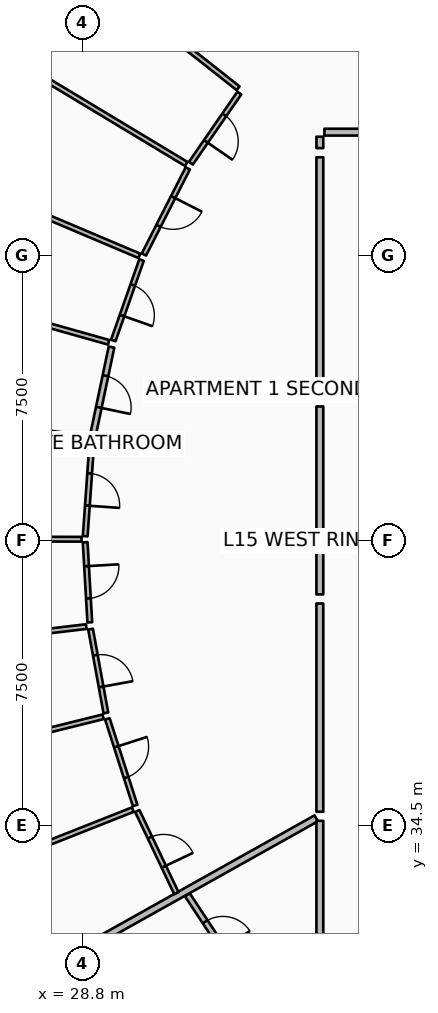
"""IFC4 building model, lengths in metres.
Left out: names, types, materials, properties, quantities, classifications, styles, units other than length and angle.
Written with IfcOpenShell. Run it as: python <this file> out.ifc"""

import sys

from ifc_helpers import new_model, si_unit, direction, frame, frame_2d, origin, place, context, subcontext, project, spatial, rectangle, extrude, element, fill, save


model = new_model("IFC4")
c1 = context("Model", 3, precision=1e-05, world=origin(), true_north=direction((0.0, 1.0)))
c2 = subcontext(c1, "Body", "Model", "MODEL_VIEW")
j1 = project(units=[si_unit("LENGTHUNIT", "METRE"), si_unit("PLANEANGLEUNIT", "RADIAN")], contexts=[c1])
p1 = place(None, origin())
s1 = spatial("IfcSite", under=j1, at=p1, CompositionType="ELEMENT")
p2 = place(p1, origin())
s2 = spatial("IfcBuilding", under=s1, at=p2, CompositionType="ELEMENT")
p3 = place(p2, frame((0.0, 0.0, 63.9)))
s3 = spatial("IfcBuildingStorey", under=s2, at=p3, CompositionType="ELEMENT", Elevation=63.9)
p4 = place(p3, frame((34.954, 34.694, 0.0), z_axis=(0.0, 0.0, 1.0), x_axis=(-0.872493465611, -0.488625779577, 0.0)))
e1 = element("IfcWall", 1, at=p4, inside=s3, PredefinedType="PARTITIONING", context=c2, shape_type="SweptSolid", body=[
    extrude(rectangle(XDim=16.586, YDim=0.18, at=frame_2d((8.293, 0.0))), origin(), (0.0, 0.0, 1.0), 2.867),
])
p5 = place(p3, frame((41.86, 52.75, 0.0), z_axis=(0.0, 0.0, 1.0), x_axis=(-1.0, 0.0, 0.0)))
e2 = element("IfcWall", 2, at=p5, inside=s3, PredefinedType="PARTITIONING", context=c2, shape_type="SweptSolid", body=[
    extrude(rectangle(XDim=6.69, YDim=0.18, at=frame_2d((3.345, 0.0))), origin(), (0.0, 0.0, 1.0), 2.867),
])
p6 = place(p5, frame((2.795, 0.0, 0.0)))
e3 = element("IfcOpeningElement", 3, at=p6, cuts=e2, PredefinedType="OPENING", context=c2, shape_type="SweptSolid", body=[
    extrude(rectangle(XDim=1.1, YDim=2.1, at=frame_2d((0.55, 1.05))), frame((0.0, 0.1, 0.0), z_axis=(0.0, -1.0, 0.0), x_axis=(1.0, 0.0, 0.0)), (0.0, 0.0, 1.0), 0.2),
])
p7 = place(p3, frame((35.05, 52.63, 0.0), z_axis=(0.0, 0.0, 1.0), x_axis=(0.0, -1.0, 0.0)))
e4 = element("IfcWall", 4, at=p7, inside=s3, PredefinedType="PARTITIONING", context=c2, shape_type="SweptSolid", body=[
    extrude(rectangle(XDim=0.301, YDim=0.18, at=frame_2d((0.15, 0.0))), origin(), (0.0, 0.0, 1.0), 2.867),
])
p8 = place(p3, frame((35.05, 52.089, 0.0), z_axis=(0.0, 0.0, 1.0), x_axis=(0.0, -1.0, 0.0)))
e5 = element("IfcWall", 5, at=p8, inside=s3, PredefinedType="PARTITIONING", context=c2, shape_type="SweptSolid", body=[
    extrude(rectangle(XDim=6.317, YDim=0.18, at=frame_2d((3.158, 0.0))), origin(), (0.0, 0.0, 1.0), 2.867),
])
p9 = place(p3, frame((32.898, 53.905, 0.0), z_axis=(0.0, 0.0, 1.0), x_axis=(-0.78532854108, 0.619079221558, 0.0)))
e6 = element("IfcWall", 6, at=p9, inside=s3, PredefinedType="PARTITIONING", context=c2, shape_type="SweptSolid", body=[
    extrude(rectangle(XDim=8.842, YDim=0.125, at=frame_2d((4.421, 0.0))), origin(), (0.0, 0.0, 1.0), 2.867),
])
p10 = place(p3, frame((31.534, 51.913, 0.0), z_axis=(0.0, 0.0, 1.0), x_axis=(-0.856706990958, 0.515803384676, 0.0)))
e7 = element("IfcWall", 7, at=p10, inside=s3, PredefinedType="PARTITIONING", context=c2, shape_type="SweptSolid", body=[
    extrude(rectangle(XDim=9.057, YDim=0.125, at=frame_2d((4.528, 0.0))), origin(), (0.0, 0.0, 1.0), 2.94),
])
p11 = place(p3, frame((30.301, 49.494, 0.0), z_axis=(0.0, 0.0, 1.0), x_axis=(-0.920840746031, 0.389938867579, 0.0)))
e8 = element("IfcWall", 8, at=p11, inside=s3, PredefinedType="PARTITIONING", context=c2, shape_type="SweptSolid", body=[
    extrude(rectangle(XDim=9.966, YDim=0.125, at=frame_2d((4.983, 0.0))), origin(), (0.0, 0.0, 1.0), 2.94),
])
p12 = place(p3, frame((32.931, 53.778, 0.0), z_axis=(0.0, 0.0, 1.0), x_axis=(-0.568541738061, -0.822654418382, 0.0)))
e9 = element("IfcWall", 9, at=p12, inside=s3, PredefinedType="PARTITIONING", context=c2, shape_type="SweptSolid", body=[
    extrude(rectangle(XDim=2.242, YDim=0.125, at=frame_2d((1.121, 0.0))), origin(), (0.0, 0.0, 1.0), 2.867),
])
p13 = place(p12, frame((0.696, 0.0, 0.0)))
e10 = element("IfcOpeningElement", 10, at=p13, cuts=e9, PredefinedType="OPENING", context=c2, shape_type="SweptSolid", body=[
    extrude(rectangle(XDim=0.85, YDim=2.06, at=frame_2d((0.425, 1.03))), frame((0.0, 0.073, 0.0), z_axis=(0.0, -1.0, 0.0), x_axis=(1.0, 0.0, 0.0)), (0.0, 0.0, 1.0), 0.145),
])
p14 = place(p3, frame((31.575, 51.796, 0.0), z_axis=(0.0, 0.0, 1.0), x_axis=(-0.454037986735, -0.890982326762, 0.0)))
e11 = element("IfcWall", 11, at=p14, inside=s3, PredefinedType="PARTITIONING", context=c2, shape_type="SweptSolid", body=[
    extrude(rectangle(XDim=2.542, YDim=0.125, at=frame_2d((1.271, 0.0))), origin(), (0.0, 0.0, 1.0), 2.94),
])
p15 = place(p14, frame((0.846, 0.0, 0.0)))
e12 = element("IfcOpeningElement", 12, at=p15, cuts=e11, PredefinedType="OPENING", context=c2, shape_type="SweptSolid", body=[
    extrude(rectangle(XDim=0.85, YDim=2.06, at=frame_2d((0.425, 1.03))), frame((0.0, 0.073, 0.0), z_axis=(0.0, -1.0, 0.0), x_axis=(1.0, 0.0, 0.0)), (0.0, 0.0, 1.0), 0.145),
])
p16 = place(p3, frame((30.358, 49.384, 0.0), z_axis=(0.0, 0.0, 1.0), x_axis=(-0.331344536708, -0.943509829304, 0.0)))
e13 = element("IfcWall", 13, at=p16, inside=s3, PredefinedType="PARTITIONING", context=c2, shape_type="SweptSolid", body=[
    extrude(rectangle(XDim=2.242, YDim=0.125, at=frame_2d((1.121, 0.0))), origin(), (0.0, 0.0, 1.0), 2.867),
])
p17 = place(p16, frame((0.696, 0.0, 0.0)))
e14 = element("IfcOpeningElement", 14, at=p17, cuts=e13, PredefinedType="OPENING", context=c2, shape_type="SweptSolid", body=[
    extrude(rectangle(XDim=0.85, YDim=2.06, at=frame_2d((0.425, 1.03))), frame((0.0, 0.073, 0.0), z_axis=(0.0, -1.0, 0.0), x_axis=(1.0, 0.0, 0.0)), (0.0, 0.0, 1.0), 0.145),
])
p18 = place(p3, frame((35.05, 45.532, 0.0), z_axis=(0.0, 0.0, 1.0), x_axis=(0.0, -1.0, 0.0)))
e15 = element("IfcWall", 15, at=p18, inside=s3, PredefinedType="PARTITIONING", context=c2, shape_type="SweptSolid", body=[
    extrude(rectangle(XDim=4.945, YDim=0.18, at=frame_2d((2.472, 0.0))), origin(), (0.0, 0.0, 1.0), 2.867),
])
p19 = place(p3, frame((29.492, 47.22, 0.0), z_axis=(0.0, 0.0, 1.0), x_axis=(-0.962454721813, 0.271442274635, 0.0)))
e16 = element("IfcWall", 16, at=p19, inside=s3, PredefinedType="PARTITIONING", context=c2, shape_type="SweptSolid", body=[
    extrude(rectangle(XDim=11.344, YDim=0.125, at=frame_2d((5.672, 0.0))), origin(), (0.0, 0.0, 1.0), 2.867),
])
p20 = place(p3, frame((29.568, 47.095, 0.0), z_axis=(0.0, 0.0, 1.0), x_axis=(-0.205861309483, -0.978581177654, 0.0)))
e17 = element("IfcWall", 17, at=p20, inside=s3, PredefinedType="PARTITIONING", context=c2, shape_type="SweptSolid", body=[
    extrude(rectangle(XDim=2.392, YDim=0.15, at=frame_2d((1.196, 0.0))), origin(), (0.0, 0.0, 1.0), 2.867),
])
p21 = place(p20, frame((0.771, 0.0, 0.0)))
e18 = element("IfcOpeningElement", 18, at=p21, cuts=e17, PredefinedType="OPENING", context=c2, shape_type="SweptSolid", body=[
    extrude(rectangle(XDim=0.85, YDim=2.06, at=frame_2d((0.425, 1.03))), frame((0.0, 0.085, 0.0), z_axis=(0.0, -1.0, 0.0), x_axis=(1.0, 0.0, 0.0)), (0.0, 0.0, 1.0), 0.17),
])
p22 = place(p3, frame((28.968, 44.678, 0.0), z_axis=(0.0, 0.0, 1.0), x_axis=(-0.990240767804, 0.139367219172, 0.0)))
e19 = element("IfcWall", 19, at=p22, inside=s3, PredefinedType="PARTITIONING", context=c2, shape_type="SweptSolid", body=[
    extrude(rectangle(XDim=4.46, YDim=0.15, at=frame_2d((2.23, 0.0))), origin(), (0.0, 0.0, 1.0), 2.94),
])
p23 = place(p3, frame((28.78, 42.038, 0.0), z_axis=(0.0, 0.0, 1.0), x_axis=(-0.999998036955, 0.001981435282, 0.0)))
e20 = element("IfcWall", 20, at=p23, inside=s3, PredefinedType="PARTITIONING", context=c2, shape_type="SweptSolid", body=[
    extrude(rectangle(XDim=12.075, YDim=0.125, at=frame_2d((6.038, 0.0))), origin(), (0.0, 0.0, 1.0), 2.94),
])
p24 = place(p3, frame((29.05, 44.576, 0.0), z_axis=(0.0, 0.0, 1.0), x_axis=(-0.070831673661, -0.997488282641, 0.0)))
e21 = element("IfcWall", 21, at=p24, inside=s3, PredefinedType="PARTITIONING", context=c2, shape_type="SweptSolid", body=[
    extrude(rectangle(XDim=2.464, YDim=0.125, at=frame_2d((1.232, 0.0))), origin(), (0.0, 0.0, 1.0), 2.94),
])
p25 = place(p24, frame((0.807, 0.0, 0.0)))
e22 = element("IfcOpeningElement", 22, at=p25, cuts=e21, PredefinedType="OPENING", context=c2, shape_type="SweptSolid", body=[
    extrude(rectangle(XDim=0.85, YDim=2.06, at=frame_2d((0.425, 1.03))), frame((0.0, 0.073, 0.0), z_axis=(0.0, -1.0, 0.0), x_axis=(1.0, 0.0, 0.0)), (0.0, 0.0, 1.0), 0.145),
])
p26 = place(p3, frame((28.875, 41.958, 0.0), z_axis=(0.0, 0.0, 1.0), x_axis=(0.057962417622, -0.998318765797, 0.0)))
e23 = element("IfcWall", 23, at=p26, inside=s3, PredefinedType="PARTITIONING", context=c2, shape_type="SweptSolid", body=[
    extrude(rectangle(XDim=2.11, YDim=0.125, at=frame_2d((1.055, 0.0))), origin(), (0.0, 0.0, 1.0), 2.867),
])
p27 = place(p26, frame((0.63, 0.0, 0.0)))
e24 = element("IfcOpeningElement", 24, at=p27, cuts=e23, PredefinedType="OPENING", context=c2, shape_type="SweptSolid", body=[
    extrude(rectangle(XDim=0.85, YDim=2.06, at=frame_2d((0.425, 1.03))), frame((0.0, 0.073, 0.0), z_axis=(0.0, -1.0, 0.0), x_axis=(1.0, 0.0, 0.0)), (0.0, 0.0, 1.0), 0.145),
])
p28 = place(p3, frame((35.05, 40.347, 0.0), z_axis=(0.0, 0.0, 1.0), x_axis=(0.0, -1.0, 0.0)))
e25 = element("IfcWall", 25, at=p28, inside=s3, PredefinedType="PARTITIONING", context=c2, shape_type="SweptSolid", body=[
    extrude(rectangle(XDim=5.48, YDim=0.18, at=frame_2d((2.74, 0.0))), origin(), (0.0, 0.0, 1.0), 2.867),
])
p29 = place(p3, frame((28.903, 39.74, 0.0), z_axis=(0.0, 0.0, 1.0), x_axis=(-0.993068040113, -0.117540919282, 0.0)))
e26 = element("IfcWall", 26, at=p29, inside=s3, PredefinedType="PARTITIONING", context=c2, shape_type="SweptSolid", body=[
    extrude(rectangle(XDim=12.309, YDim=0.125, at=frame_2d((6.154, 0.0))), origin(), (0.0, 0.0, 1.0), 2.867),
])
p30 = place(p3, frame((29.347, 37.366, 0.0), z_axis=(0.0, 0.0, 1.0), x_axis=(-0.970510462135, -0.241059002917, 0.0)))
e27 = element("IfcWall", 27, at=p30, inside=s3, PredefinedType="PARTITIONING", context=c2, shape_type="SweptSolid", body=[
    extrude(rectangle(XDim=11.79, YDim=0.125, at=frame_2d((5.895, 0.0))), origin(), (0.0, 0.0, 1.0), 2.94),
])
p31 = place(p3, frame((30.13, 34.925, 0.0), z_axis=(0.0, 0.0, 1.0), x_axis=(-0.929770978957, -0.368138461302, 0.0)))
e28 = element("IfcWall", 28, at=p31, inside=s3, PredefinedType="PARTITIONING", context=c2, shape_type="SweptSolid", body=[
    extrude(rectangle(XDim=11.773, YDim=0.125, at=frame_2d((5.887, 0.0))), origin(), (0.0, 0.0, 1.0), 2.94),
])
p32 = place(p3, frame((29.017, 39.673, 0.0), z_axis=(0.0, 0.0, 1.0), x_axis=(0.179632658462, -0.983733758704, 0.0)))
e29 = element("IfcWall", 29, at=p32, inside=s3, PredefinedType="PARTITIONING", context=c2, shape_type="SweptSolid", body=[
    extrude(rectangle(XDim=2.242, YDim=0.125, at=frame_2d((1.121, 0.0))), origin(), (0.0, 0.0, 1.0), 2.867),
])
p33 = place(p32, frame((0.696, 0.0, 0.0)))
e30 = element("IfcOpeningElement", 30, at=p33, cuts=e29, PredefinedType="OPENING", context=c2, shape_type="SweptSolid", body=[
    extrude(rectangle(XDim=0.85, YDim=2.06, at=frame_2d((0.425, 1.03))), frame((0.0, 0.073, 0.0), z_axis=(0.0, -1.0, 0.0), x_axis=(1.0, 0.0, 0.0)), (0.0, 0.0, 1.0), 0.145),
])
p34 = place(p3, frame((29.458, 37.312, 0.0), z_axis=(0.0, 0.0, 1.0), x_axis=(0.305338513131, -0.952243872335, 0.0)))
e31 = element("IfcWall", 31, at=p34, inside=s3, PredefinedType="PARTITIONING", context=c2, shape_type="SweptSolid", body=[
    extrude(rectangle(XDim=2.392, YDim=0.125, at=frame_2d((1.196, 0.0))), origin(), (0.0, 0.0, 1.0), 2.94),
])
p35 = place(p34, frame((0.771, 0.0, 0.0)))
e32 = element("IfcOpeningElement", 32, at=p35, cuts=e31, PredefinedType="OPENING", context=c2, shape_type="SweptSolid", body=[
    extrude(rectangle(XDim=0.85, YDim=2.06, at=frame_2d((0.425, 1.03))), frame((0.0, 0.073, 0.0), z_axis=(0.0, -1.0, 0.0), x_axis=(1.0, 0.0, 0.0)), (0.0, 0.0, 1.0), 0.145),
])
p36 = place(p3, frame((30.248, 34.885, 0.0), z_axis=(0.0, 0.0, 1.0), x_axis=(0.429366977128, -0.903130111862, 0.0)))
e33 = element("IfcWall", 33, at=p36, inside=s3, PredefinedType="PARTITIONING", context=c2, shape_type="SweptSolid", body=[
    extrude(rectangle(XDim=2.392, YDim=0.125, at=frame_2d((1.196, 0.0))), origin(), (0.0, 0.0, 1.0), 2.867),
])
p37 = place(p36, frame((0.771, 0.0, 0.0)))
e34 = element("IfcOpeningElement", 34, at=p37, cuts=e33, PredefinedType="OPENING", context=c2, shape_type="SweptSolid", body=[
    extrude(rectangle(XDim=0.85, YDim=2.06, at=frame_2d((0.425, 1.03))), frame((0.0, 0.073, 0.0), z_axis=(0.0, -1.0, 0.0), x_axis=(1.0, 0.0, 0.0)), (0.0, 0.0, 1.0), 0.145),
])
p38 = place(p3, frame((35.05, 34.628, 0.0), z_axis=(0.0, 0.0, 1.0), x_axis=(0.0, -1.0, 0.0)))
e35 = element("IfcWall", 35, at=p38, inside=s3, PredefinedType="PARTITIONING", context=c2, shape_type="SweptSolid", body=[
    extrude(rectangle(XDim=3.258, YDim=0.18, at=frame_2d((1.629, 0.0))), origin(), (0.0, 0.0, 1.0), 2.867),
])
p39 = place(p3, frame((31.565, 32.682, 0.0), z_axis=(0.0, 0.0, 1.0), x_axis=(0.550533618108, -0.834812994229, 0.0)))
e36 = element("IfcWall", 36, at=p39, inside=s3, PredefinedType="PARTITIONING", context=c2, shape_type="SweptSolid", body=[
    extrude(rectangle(XDim=2.546, YDim=0.15, at=frame_2d((1.273, 0.0))), origin(), (0.0, 0.0, 1.0), 2.867),
])
p40 = place(p39, frame((0.848, 0.0, 0.0)))
e37 = element("IfcOpeningElement", 37, at=p40, cuts=e36, PredefinedType="OPENING", context=c2, shape_type="SweptSolid", body=[
    extrude(rectangle(XDim=0.85, YDim=2.06, at=frame_2d((0.425, 1.03))), frame((0.0, 0.085, 0.0), z_axis=(0.0, -1.0, 0.0), x_axis=(1.0, 0.0, 0.0)), (0.0, 0.0, 1.0), 0.17),
])
p41 = place(p13, origin())
e38 = element("IfcDoor", 38, at=p41, inside=s3, OperationType="SINGLE_SWING_RIGHT", PredefinedType="DOOR", context=c2, shape_type="SweptSolid", body=[
    extrude(rectangle(XDim=0.85, YDim=2.06, at=frame_2d((0.425, 1.03))), frame((0.0, 0.025, 0.0), z_axis=(0.0, -1.0, 0.0), x_axis=(1.0, 0.0, 0.0)), (0.0, 0.0, 1.0), 0.05),
])
fill(e10, e38)
p42 = place(p15, origin())
e39 = element("IfcDoor", 39, at=p42, inside=s3, OperationType="SINGLE_SWING_LEFT", PredefinedType="DOOR", context=c2, shape_type="SweptSolid", body=[
    extrude(rectangle(XDim=0.85, YDim=2.06, at=frame_2d((0.425, 1.03))), frame((0.0, 0.025, 0.0), z_axis=(0.0, -1.0, 0.0), x_axis=(1.0, 0.0, 0.0)), (0.0, 0.0, 1.0), 0.05),
])
fill(e12, e39)
p43 = place(p17, origin())
e40 = element("IfcDoor", 40, at=p43, inside=s3, OperationType="SINGLE_SWING_RIGHT", PredefinedType="DOOR", context=c2, shape_type="SweptSolid", body=[
    extrude(rectangle(XDim=0.85, YDim=2.06, at=frame_2d((0.425, 1.03))), frame((0.0, 0.025, 0.0), z_axis=(0.0, -1.0, 0.0), x_axis=(1.0, 0.0, 0.0)), (0.0, 0.0, 1.0), 0.05),
])
fill(e14, e40)
p44 = place(p21, origin())
e41 = element("IfcDoor", 41, at=p44, inside=s3, OperationType="SINGLE_SWING_RIGHT", PredefinedType="DOOR", context=c2, shape_type="SweptSolid", body=[
    extrude(rectangle(XDim=0.85, YDim=2.06, at=frame_2d((0.425, 1.03))), frame((0.0, 0.025, 0.0), z_axis=(0.0, -1.0, 0.0), x_axis=(1.0, 0.0, 0.0)), (0.0, 0.0, 1.0), 0.05),
])
fill(e18, e41)
p45 = place(p25, origin())
e42 = element("IfcDoor", 42, at=p45, inside=s3, OperationType="SINGLE_SWING_RIGHT", PredefinedType="DOOR", context=c2, shape_type="SweptSolid", body=[
    extrude(rectangle(XDim=0.85, YDim=2.06, at=frame_2d((0.425, 1.03))), frame((0.0, 0.025, 0.0), z_axis=(0.0, -1.0, 0.0), x_axis=(1.0, 0.0, 0.0)), (0.0, 0.0, 1.0), 0.05),
])
fill(e22, e42)
p46 = place(p27, origin())
e43 = element("IfcDoor", 43, at=p46, inside=s3, OperationType="SINGLE_SWING_LEFT", PredefinedType="DOOR", context=c2, shape_type="SweptSolid", body=[
    extrude(rectangle(XDim=0.85, YDim=2.06, at=frame_2d((0.425, 1.03))), frame((0.0, 0.025, 0.0), z_axis=(0.0, -1.0, 0.0), x_axis=(1.0, 0.0, 0.0)), (0.0, 0.0, 1.0), 0.05),
])
fill(e24, e43)
p47 = place(p33, origin())
e44 = element("IfcDoor", 44, at=p47, inside=s3, OperationType="SINGLE_SWING_RIGHT", PredefinedType="DOOR", context=c2, shape_type="SweptSolid", body=[
    extrude(rectangle(XDim=0.85, YDim=2.06, at=frame_2d((0.425, 1.03))), frame((0.0, 0.025, 0.0), z_axis=(0.0, -1.0, 0.0), x_axis=(1.0, 0.0, 0.0)), (0.0, 0.0, 1.0), 0.05),
])
fill(e30, e44)
p48 = place(p35, origin())
e45 = element("IfcDoor", 45, at=p48, inside=s3, OperationType="SINGLE_SWING_LEFT", PredefinedType="DOOR", context=c2, shape_type="SweptSolid", body=[
    extrude(rectangle(XDim=0.85, YDim=2.06, at=frame_2d((0.425, 1.03))), frame((0.0, 0.025, 0.0), z_axis=(0.0, -1.0, 0.0), x_axis=(1.0, 0.0, 0.0)), (0.0, 0.0, 1.0), 0.05),
])
fill(e32, e45)
p49 = place(p37, origin())
e46 = element("IfcDoor", 46, at=p49, inside=s3, OperationType="SINGLE_SWING_RIGHT", PredefinedType="DOOR", context=c2, shape_type="SweptSolid", body=[
    extrude(rectangle(XDim=0.85, YDim=2.06, at=frame_2d((0.425, 1.03))), frame((0.0, 0.025, 0.0), z_axis=(0.0, -1.0, 0.0), x_axis=(1.0, 0.0, 0.0)), (0.0, 0.0, 1.0), 0.05),
])
fill(e34, e46)
p50 = place(p40, origin())
e47 = element("IfcDoor", 47, at=p50, inside=s3, OperationType="SINGLE_SWING_RIGHT", PredefinedType="DOOR", context=c2, shape_type="SweptSolid", body=[
    extrude(rectangle(XDim=0.85, YDim=2.06, at=frame_2d((0.425, 1.03))), frame((0.0, 0.025, 0.0), z_axis=(0.0, -1.0, 0.0), x_axis=(1.0, 0.0, 0.0)), (0.0, 0.0, 1.0), 0.05),
])
fill(e37, e47)
save(model, sys.argv[1])
